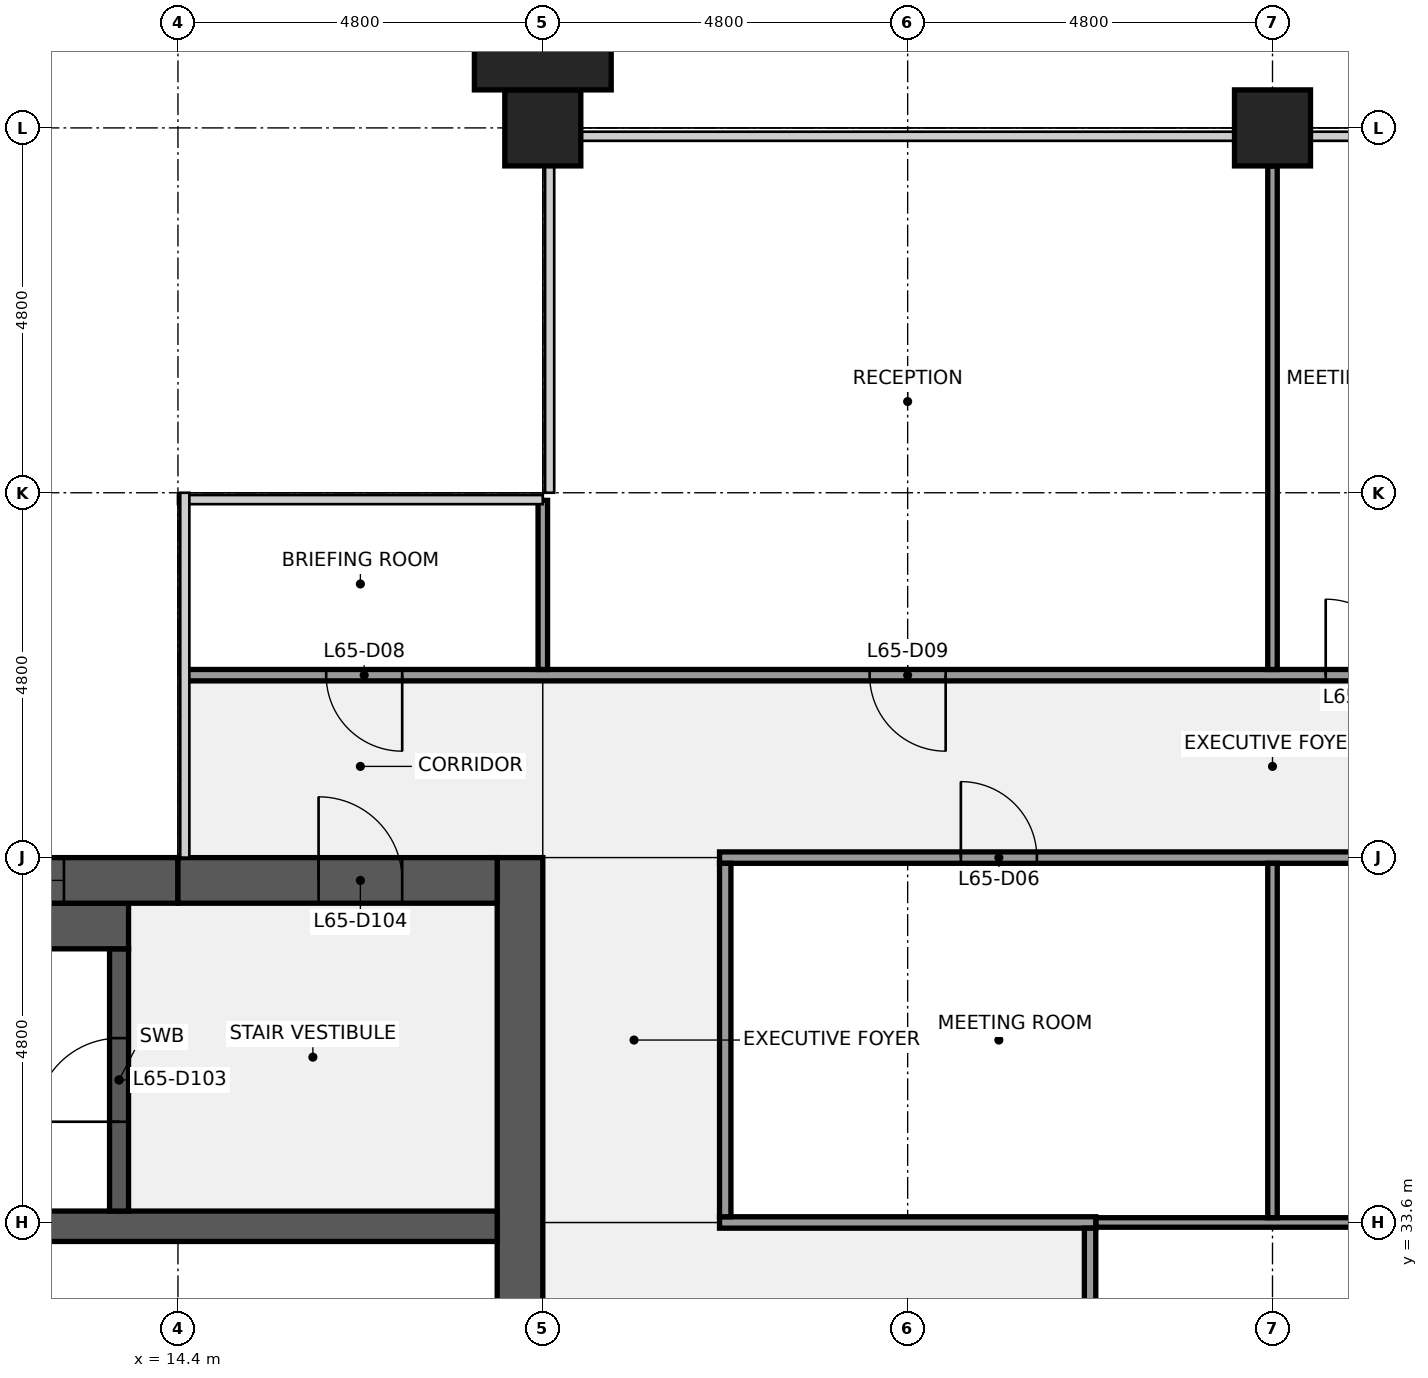
"""IFC4 building model, lengths in metres.
Left out: names, types, materials, properties, quantities, classifications, styles, units other than length and angle.
Written with IfcOpenShell. Run it as: python <this file> out.ifc"""

import sys

from ifc_helpers import new_model, si_unit, direction, frame, frame_2d, origin, origin_2d, place, context, subcontext, project, spatial, rectangle, extrude, element, fill, save


model = new_model("IFC4")
c1 = context("Model", 3, precision=1e-05, world=origin(), true_north=direction((0.0, 1.0)))
c2 = subcontext(c1, "Body", "Model", "MODEL_VIEW")
j1 = project(units=[si_unit("LENGTHUNIT", "METRE"), si_unit("PLANEANGLEUNIT", "RADIAN")], contexts=[c1])
p1 = place(None, origin())
s1 = spatial("IfcSite", under=j1, at=p1, CompositionType="ELEMENT")
p2 = place(p1, origin())
s2 = spatial("IfcBuilding", under=s1, at=p2, CompositionType="ELEMENT")
p3 = place(p2, frame((0.0, 0.0, 298.3)))
s3 = spatial("IfcBuildingStorey", under=s2, at=p3, CompositionType="ELEMENT", Elevation=298.3)
for number, where, z_axis, x_axis in (
    (1, (19.2, 48.0, 0.0), (0.0, 0.0, 1.0), (1.0, 0.0, 0.0)),
    (2, (28.8, 48.0, 0.0), (0.0, 0.0, 1.0), (1.0, 0.0, 0.0)),
):
    element("IfcColumn", number, at=place(p3, frame(where, z_axis=z_axis, x_axis=x_axis)), inside=s3, PredefinedType="COLUMN", context=c2, shape_type="SweptSolid", body=[
        extrude(rectangle(XDim=1.0, YDim=1.0, at=origin_2d()), origin(), (0.0, 0.0, 1.0), 4.0),
    ])
p4 = place(p3, frame((18.9, 38.4, 0.0), z_axis=(0.0, 0.0, 1.0), x_axis=(0.0, -1.0, 0.0)))
e3 = element("IfcWall", 3, at=p4, inside=s3, PredefinedType="SHEAR", context=c2, shape_type="SweptSolid", body=[
    extrude(rectangle(XDim=28.8, YDim=0.6, at=frame_2d((14.4, 0.0))), origin(), (0.0, 0.0, 1.0), 3.84),
])
p5 = place(p4, frame((18.3, 0.0, 0.0)))
e4 = element("IfcOpeningElement", 4, at=p5, cuts=e3, PredefinedType="OPENING", context=c2, shape_type="SweptSolid", body=[
    extrude(rectangle(XDim=1.8, YDim=2.1, at=frame_2d((0.9, 1.05))), frame((0.0, 0.31, 0.0), z_axis=(0.0, -1.0, 0.0), x_axis=(1.0, 0.0, 0.0)), (0.0, 0.0, 1.0), 0.62),
])
p6 = place(p4, frame((8.7, 0.0, 0.0)))
e5 = element("IfcOpeningElement", 5, at=p6, cuts=e3, PredefinedType="OPENING", context=c2, shape_type="SweptSolid", body=[
    extrude(rectangle(XDim=1.8, YDim=2.1, at=frame_2d((0.9, 1.05))), frame((0.0, 0.31, 0.0), z_axis=(0.0, -1.0, 0.0), x_axis=(1.0, 0.0, 0.0)), (0.0, 0.0, 1.0), 0.62),
])
p7 = place(p3, frame((0.6, 33.55, 0.0), z_axis=(0.0, 0.0, 1.0), x_axis=(1.0, 0.0, 0.0)))
e6 = element("IfcWall", 6, at=p7, inside=s3, PredefinedType="SHEAR", context=c2, shape_type="SweptSolid", body=[
    extrude(rectangle(XDim=18.0, YDim=0.4, at=frame_2d((9.0, 0.0))), origin(), (0.0, 0.0, 1.0), 3.84),
])
p8 = place(p3, frame((13.625, 33.75, 0.0), z_axis=(0.0, 0.0, 1.0), x_axis=(0.0, 1.0, 0.0)))
e7 = element("IfcWall", 7, at=p8, inside=s3, PredefinedType="SHEAR", context=c2, shape_type="SweptSolid", body=[
    extrude(rectangle(XDim=3.45, YDim=0.25, at=frame_2d((1.725, 0.0))), origin(), (0.0, 0.0, 1.0), 3.84),
])
p9 = place(p8, frame((1.175, 0.0, 0.0)))
e8 = element("IfcOpeningElement", 8, at=p9, cuts=e7, PredefinedType="OPENING", context=c2, shape_type="SweptSolid", body=[
    extrude(rectangle(XDim=1.1, YDim=2.1, at=frame_2d((0.55, 1.05))), frame((0.0, 0.135, 0.0), z_axis=(0.0, -1.0, 0.0), x_axis=(1.0, 0.0, 0.0)), (0.0, 0.0, 1.0), 0.27),
])
p10 = place(p3, frame((6.25, 37.5, 0.0), z_axis=(0.0, 0.0, 1.0), x_axis=(1.0, 0.0, 0.0)))
e9 = element("IfcWall", 9, at=p10, inside=s3, PredefinedType="SHEAR", context=c2, shape_type="SweptSolid", body=[
    extrude(rectangle(XDim=7.5, YDim=0.6, at=frame_2d((3.75, 0.0))), origin(), (0.0, 0.0, 1.0), 3.84),
])
p11 = place(p3, frame((0.6, 38.1, 0.0), z_axis=(0.0, 0.0, 1.0), x_axis=(1.0, 0.0, 0.0)))
e10 = element("IfcWall", 10, at=p11, inside=s3, PredefinedType="SHEAR", context=c2, shape_type="SweptSolid", body=[
    extrude(rectangle(XDim=13.8, YDim=0.6, at=frame_2d((6.9, 0.0))), origin(), (0.0, 0.0, 1.0), 3.84),
])
p12 = place(p11, frame((5.7, 0.0, 0.9)))
e11 = element("IfcOpeningElement", 11, at=p12, cuts=e10, PredefinedType="OPENING", context=c2, shape_type="SweptSolid", body=[
    extrude(rectangle(XDim=1.8, YDim=1.5, at=frame_2d((0.9, 0.75))), frame((0.0, 0.31, 0.0), z_axis=(0.0, -1.0, 0.0), x_axis=(1.0, 0.0, 0.0)), (0.0, 0.0, 1.0), 0.62),
])
p13 = place(p11, frame((10.5, 0.0, 0.9)))
e12 = element("IfcOpeningElement", 12, at=p13, cuts=e10, PredefinedType="OPENING", context=c2, shape_type="SweptSolid", body=[
    extrude(rectangle(XDim=1.8, YDim=1.5, at=frame_2d((0.9, 0.75))), frame((0.0, 0.31, 0.0), z_axis=(0.0, -1.0, 0.0), x_axis=(1.0, 0.0, 0.0)), (0.0, 0.0, 1.0), 0.62),
])
p14 = place(p3, frame((14.4, 38.1, 0.0), z_axis=(0.0, 0.0, 1.0), x_axis=(1.0, 0.0, 0.0)))
e13 = element("IfcWall", 13, at=p14, inside=s3, PredefinedType="SHEAR", context=c2, shape_type="SweptSolid", body=[
    extrude(rectangle(XDim=4.2, YDim=0.6, at=frame_2d((2.1, 0.0))), origin(), (0.0, 0.0, 1.0), 3.84),
])
p15 = place(p14, frame((1.85, 0.0, 0.0)))
e14 = element("IfcOpeningElement", 14, at=p15, cuts=e13, PredefinedType="OPENING", context=c2, shape_type="SweptSolid", body=[
    extrude(rectangle(XDim=1.1, YDim=2.1, at=frame_2d((0.55, 1.05))), frame((0.0, 0.31, 0.0), z_axis=(0.0, -1.0, 0.0), x_axis=(1.0, 0.0, 0.0)), (0.0, 0.0, 1.0), 0.62),
])
p16 = place(p3, frame((26.475, 33.6, 0.0), z_axis=(0.0, 0.0, 1.0), x_axis=(1.0, 0.0, 0.0)))
e15 = element("IfcWall", 15, at=p16, inside=s3, PredefinedType="PARTITIONING", context=c2, shape_type="SweptSolid", body=[
    extrude(rectangle(XDim=4.8, YDim=0.125, at=frame_2d((2.4, 0.0))), origin(), (0.0, 0.0, 1.0), 2.849),
])
p17 = place(p3, frame((21.525, 33.6, 0.0), z_axis=(0.0, 0.0, 1.0), x_axis=(1.0, 0.0, 0.0)))
e16 = element("IfcWall", 16, at=p17, inside=s3, PredefinedType="PARTITIONING", context=c2, shape_type="SweptSolid", body=[
    extrude(rectangle(XDim=4.95, YDim=0.15, at=frame_2d((2.475, 0.0))), origin(), (0.0, 0.0, 1.0), 2.849),
])
p18 = place(p3, frame((21.525, 38.4, 0.0), z_axis=(0.0, 0.0, 1.0), x_axis=(1.0, 0.0, 0.0)))
e17 = element("IfcWall", 17, at=p18, inside=s3, PredefinedType="PARTITIONING", context=c2, shape_type="SweptSolid", body=[
    extrude(rectangle(XDim=14.55, YDim=0.15, at=frame_2d((7.275, 0.0))), origin(), (0.0, 0.0, 1.0), 2.849),
])
p19 = place(p18, frame((3.175, 0.0, 0.0)))
e18 = element("IfcOpeningElement", 18, at=p19, cuts=e17, PredefinedType="OPENING", context=c2, shape_type="SweptSolid", body=[
    extrude(rectangle(XDim=1.0, YDim=2.1, at=frame_2d((0.5, 1.05))), frame((0.0, 0.085, 0.0), z_axis=(0.0, -1.0, 0.0), x_axis=(1.0, 0.0, 0.0)), (0.0, 0.0, 1.0), 0.17),
])
p20 = place(p18, frame((10.375, 0.0, 0.0)))
e19 = element("IfcOpeningElement", 19, at=p20, cuts=e17, PredefinedType="OPENING", context=c2, shape_type="SweptSolid", body=[
    extrude(rectangle(XDim=1.0, YDim=2.1, at=frame_2d((0.5, 1.05))), frame((0.0, 0.085, 0.0), z_axis=(0.0, -1.0, 0.0), x_axis=(1.0, 0.0, 0.0)), (0.0, 0.0, 1.0), 0.17),
])
p21 = place(p3, frame((14.5, 40.8, 0.0), z_axis=(0.0, 0.0, 1.0), x_axis=(1.0, 0.0, 0.0)))
e20 = element("IfcWall", 20, at=p21, inside=s3, PredefinedType="PARTITIONING", context=c2, shape_type="SweptSolid", body=[
    extrude(rectangle(XDim=28.6, YDim=0.15, at=frame_2d((14.3, 0.0))), origin(), (0.0, 0.0, 1.0), 2.849),
])
p22 = place(p21, frame((1.85, 0.0, 0.0)))
e21 = element("IfcOpeningElement", 21, at=p22, cuts=e20, PredefinedType="OPENING", context=c2, shape_type="SweptSolid", body=[
    extrude(rectangle(XDim=1.0, YDim=2.1, at=frame_2d((0.5, 1.05))), frame((0.0, 0.085, 0.0), z_axis=(0.0, -1.0, 0.0), x_axis=(1.0, 0.0, 0.0)), (0.0, 0.0, 1.0), 0.17),
])
p23 = place(p21, frame((9.0, 0.0, 0.0)))
e22 = element("IfcOpeningElement", 22, at=p23, cuts=e20, PredefinedType="OPENING", context=c2, shape_type="SweptSolid", body=[
    extrude(rectangle(XDim=1.0, YDim=2.1, at=frame_2d((0.5, 1.05))), frame((0.0, 0.085, 0.0), z_axis=(0.0, -1.0, 0.0), x_axis=(1.0, 0.0, 0.0)), (0.0, 0.0, 1.0), 0.17),
])
p24 = place(p21, frame((15.0, 0.0, 0.0)))
e23 = element("IfcOpeningElement", 23, at=p24, cuts=e20, PredefinedType="OPENING", context=c2, shape_type="SweptSolid", body=[
    extrude(rectangle(XDim=1.0, YDim=2.1, at=frame_2d((0.5, 1.05))), frame((0.0, 0.085, 0.0), z_axis=(0.0, -1.0, 0.0), x_axis=(1.0, 0.0, 0.0)), (0.0, 0.0, 1.0), 0.17),
])
p25 = place(p21, frame((19.8, 0.0, 0.0)))
e24 = element("IfcOpeningElement", 24, at=p25, cuts=e20, PredefinedType="OPENING", context=c2, shape_type="SweptSolid", body=[
    extrude(rectangle(XDim=1.0, YDim=2.1, at=frame_2d((0.5, 1.05))), frame((0.0, 0.085, 0.0), z_axis=(0.0, -1.0, 0.0), x_axis=(1.0, 0.0, 0.0)), (0.0, 0.0, 1.0), 0.17),
])
p26 = place(p21, frame((25.75, 0.0, 0.0)))
e25 = element("IfcOpeningElement", 25, at=p26, cuts=e20, PredefinedType="OPENING", context=c2, shape_type="SweptSolid", body=[
    extrude(rectangle(XDim=1.0, YDim=2.1, at=frame_2d((0.5, 1.05))), frame((0.0, 0.085, 0.0), z_axis=(0.0, -1.0, 0.0), x_axis=(1.0, 0.0, 0.0)), (0.0, 0.0, 1.0), 0.17),
])
p27 = place(p3, frame((19.2, 40.875, 0.0), z_axis=(0.0, 0.0, 1.0), x_axis=(0.0, 1.0, 0.0)))
e26 = element("IfcWall", 26, at=p27, inside=s3, PredefinedType="PARTITIONING", context=c2, shape_type="SweptSolid", body=[
    extrude(rectangle(XDim=2.225, YDim=0.125, at=frame_2d((1.113, 0.0))), origin(), (0.0, 0.0, 1.0), 2.849),
])
p28 = place(p3, frame((21.6, 33.675, 0.0), z_axis=(0.0, 0.0, 1.0), x_axis=(0.0, 1.0, 0.0)))
e27 = element("IfcWall", 27, at=p28, inside=s3, PredefinedType="PARTITIONING", context=c2, shape_type="SweptSolid", body=[
    extrude(rectangle(XDim=4.65, YDim=0.15, at=frame_2d((2.325, 0.0))), origin(), (0.0, 0.0, 1.0), 2.849),
])
p29 = place(p3, frame((26.4, 26.475, 0.0), z_axis=(0.0, 0.0, 1.0), x_axis=(0.0, 1.0, 0.0)))
e28 = element("IfcWall", 28, at=p29, inside=s3, PredefinedType="PARTITIONING", context=c2, shape_type="SweptSolid", body=[
    extrude(rectangle(XDim=7.05, YDim=0.15, at=frame_2d((3.525, 0.0))), origin(), (0.0, 0.0, 1.0), 2.849),
])
p30 = place(p29, frame((3.025, 0.0, 0.0)))
e29 = element("IfcOpeningElement", 29, at=p30, cuts=e28, PredefinedType="OPENING", context=c2, shape_type="SweptSolid", body=[
    extrude(rectangle(XDim=1.0, YDim=2.1, at=frame_2d((0.5, 1.05))), frame((0.0, 0.085, 0.0), z_axis=(0.0, -1.0, 0.0), x_axis=(1.0, 0.0, 0.0)), (0.0, 0.0, 1.0), 0.17),
])
p31 = place(p3, frame((28.8, 33.663, 0.0), z_axis=(0.0, 0.0, 1.0), x_axis=(0.0, 1.0, 0.0)))
e30 = element("IfcWall", 30, at=p31, inside=s3, PredefinedType="PARTITIONING", context=c2, shape_type="SweptSolid", body=[
    extrude(rectangle(XDim=4.662, YDim=0.125, at=frame_2d((2.331, 0.0))), origin(), (0.0, 0.0, 1.0), 2.849),
])
p32 = place(p3, frame((28.8, 40.875, 0.0), z_axis=(0.0, 0.0, 1.0), x_axis=(0.0, 1.0, 0.0)))
e31 = element("IfcWall", 31, at=p32, inside=s3, PredefinedType="PARTITIONING", context=c2, shape_type="SweptSolid", body=[
    extrude(rectangle(XDim=6.625, YDim=0.125, at=frame_2d((3.312, 0.0))), origin(), (0.0, 0.0, 1.0), 2.849),
])
p33 = place(p3, frame((19.2, 49.0, 0.0), z_axis=(0.0, 0.0, 1.0), x_axis=(1.0, 0.0, 0.0)))
e32 = element("IfcColumn", 32, at=p33, inside=s3, PredefinedType="PILASTER", context=c2, shape_type="SweptSolid", body=[
    extrude(rectangle(XDim=1.8, YDim=1.0, at=origin_2d()), origin(), (0.0, 0.0, 1.0), 4.0),
])
p34 = place(p9, origin())
e33 = element("IfcDoor", 33, at=p34, inside=s3, OperationType="SINGLE_SWING_LEFT", PredefinedType="DOOR", context=c2, shape_type="SweptSolid", body=[
    extrude(rectangle(XDim=1.1, YDim=2.1, at=frame_2d((0.55, 1.05))), frame((0.0, 0.025, 0.0), z_axis=(0.0, -1.0, 0.0), x_axis=(1.0, 0.0, 0.0)), (0.0, 0.0, 1.0), 0.05),
])
fill(e8, e33)
p35 = place(p15, origin())
e34 = element("IfcDoor", 34, at=p35, inside=s3, OperationType="SINGLE_SWING_LEFT", PredefinedType="DOOR", context=c2, shape_type="SweptSolid", body=[
    extrude(rectangle(XDim=1.1, YDim=2.1, at=frame_2d((0.55, 1.05))), frame((0.0, 0.025, 0.0), z_axis=(0.0, -1.0, 0.0), x_axis=(1.0, 0.0, 0.0)), (0.0, 0.0, 1.0), 0.05),
])
fill(e14, e34)
p36 = place(p13, origin())
e35 = element("IfcWindow", 35, at=p36, inside=s3, PartitioningType="SINGLE_PANEL", PredefinedType="WINDOW", context=c2, shape_type="SweptSolid", body=[
    extrude(rectangle(XDim=1.8, YDim=1.5, at=frame_2d((0.9, 0.75))), frame((0.0, 0.03, 0.0), z_axis=(0.0, -1.0, 0.0), x_axis=(1.0, 0.0, 0.0)), (0.0, 0.0, 1.0), 0.06),
])
fill(e12, e35)
p37 = place(p19, origin())
e36 = element("IfcDoor", 36, at=p37, inside=s3, OperationType="SINGLE_SWING_LEFT", PredefinedType="DOOR", context=c2, shape_type="SweptSolid", body=[
    extrude(rectangle(XDim=1.0, YDim=2.1, at=frame_2d((0.5, 1.05))), frame((0.0, 0.025, 0.0), z_axis=(0.0, -1.0, 0.0), x_axis=(1.0, 0.0, 0.0)), (0.0, 0.0, 1.0), 0.05),
])
fill(e18, e36)
p38 = place(p22, origin())
e37 = element("IfcDoor", 37, at=p38, inside=s3, OperationType="SINGLE_SWING_RIGHT", PredefinedType="DOOR", context=c2, shape_type="SweptSolid", body=[
    extrude(rectangle(XDim=1.0, YDim=2.1, at=frame_2d((0.5, 1.05))), frame((0.0, 0.025, 0.0), z_axis=(0.0, -1.0, 0.0), x_axis=(1.0, 0.0, 0.0)), (0.0, 0.0, 1.0), 0.05),
])
fill(e21, e37)
p39 = place(p23, origin())
e38 = element("IfcDoor", 38, at=p39, inside=s3, OperationType="SINGLE_SWING_RIGHT", PredefinedType="DOOR", context=c2, shape_type="SweptSolid", body=[
    extrude(rectangle(XDim=1.0, YDim=2.1, at=frame_2d((0.5, 1.05))), frame((0.0, 0.025, 0.0), z_axis=(0.0, -1.0, 0.0), x_axis=(1.0, 0.0, 0.0)), (0.0, 0.0, 1.0), 0.05),
])
fill(e22, e38)
p40 = place(p24, origin())
e39 = element("IfcDoor", 39, at=p40, inside=s3, OperationType="SINGLE_SWING_LEFT", PredefinedType="DOOR", context=c2, shape_type="SweptSolid", body=[
    extrude(rectangle(XDim=1.0, YDim=2.1, at=frame_2d((0.5, 1.05))), frame((0.0, 0.025, 0.0), z_axis=(0.0, -1.0, 0.0), x_axis=(1.0, 0.0, 0.0)), (0.0, 0.0, 1.0), 0.05),
])
fill(e23, e39)
save(model, sys.argv[1])
